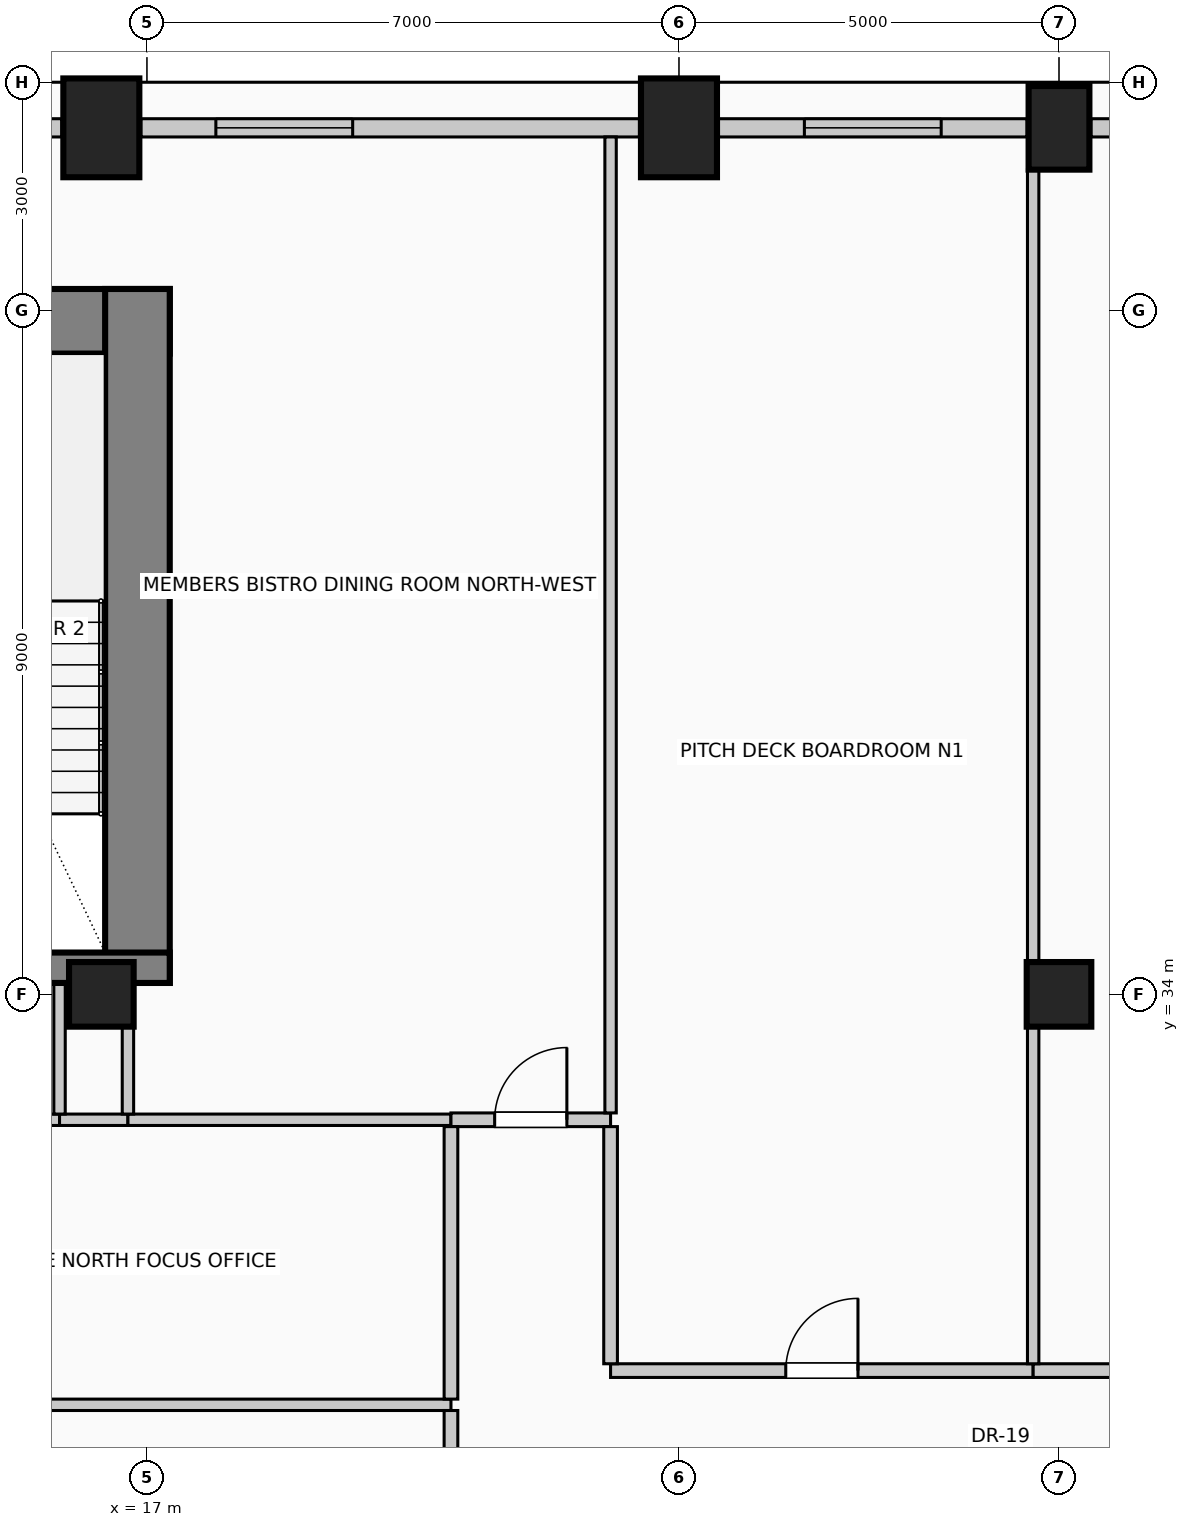
"""IFC4 building model, lengths in metres.
Left out: names, types, materials, properties, quantities, classifications, styles, units other than length and angle.
Written with IfcOpenShell. Run it as: python <this file> out.ifc"""

import sys

from ifc_helpers import new_model, si_unit, direction, frame, frame_2d, origin, origin_2d, place, context, subcontext, project, spatial, rectangle, circle, extrude, element, fill, save


model = new_model("IFC4")
c1 = context("Model", 3, precision=1e-05, world=origin(), true_north=direction((0.0, 1.0)))
c2 = subcontext(c1, "Body", "Model", "MODEL_VIEW")
j1 = project(units=[si_unit("LENGTHUNIT", "METRE"), si_unit("PLANEANGLEUNIT", "RADIAN")], contexts=[c1])
p1 = place(None, origin())
s1 = spatial("IfcSite", under=j1, at=p1, CompositionType="ELEMENT")
p2 = place(p1, origin())
s2 = spatial("IfcBuilding", under=s1, at=p2, CompositionType="ELEMENT")
p3 = place(p2, frame((0.0, 0.0, 174.6)))
s3 = spatial("IfcBuildingStorey", under=s2, at=p3, CompositionType="ELEMENT", Elevation=174.6)
p4 = place(p3, frame((2.7, 42.855, 0.0), z_axis=(0.0, 0.0, 1.0), x_axis=(1.0, 0.0, 0.0)))
e1 = element("IfcWall", 1, at=p4, inside=s3, PredefinedType="SHEAR", context=c2, shape_type="SweptSolid", body=[
    extrude(rectangle(XDim=14.6, YDim=0.85, at=frame_2d((7.3, 0.0))), origin(), (0.0, 0.0, 1.0), 4.0),
])
p5 = place(p3, frame((16.875, 34.15, 0.0), z_axis=(0.0, 0.0, 1.0), x_axis=(0.0, 1.0, 0.0)))
e2 = element("IfcWall", 2, at=p5, inside=s3, PredefinedType="SHEAR", context=c2, shape_type="SweptSolid", body=[
    extrude(rectangle(XDim=9.13, YDim=0.85, at=frame_2d((4.565, 0.0))), origin(), (0.0, 0.0, 1.0), 4.0),
])
p6 = place(p3, frame((12.29, 34.35, 0.0), z_axis=(0.0, 0.0, 1.0), x_axis=(1.0, 0.0, 0.0)))
e3 = element("IfcWall", 3, at=p6, inside=s3, PredefinedType="SHEAR", context=c2, shape_type="SweptSolid", body=[
    extrude(rectangle(XDim=5.01, YDim=0.4, at=frame_2d((2.505, 0.0))), origin(), (0.0, 0.0, 1.0), 4.0),
])
p7 = place(p6, frame((1.4, 0.0, 0.0)))
e4 = element("IfcOpeningElement", 4, at=p7, cuts=e3, PredefinedType="OPENING", context=c2, shape_type="SweptSolid", body=[
    extrude(rectangle(XDim=1.15, YDim=2.2, at=frame_2d((0.575, 1.1))), frame((0.0, 0.21, 0.0), z_axis=(0.0, -1.0, 0.0), x_axis=(1.0, 0.0, 0.0)), (0.0, 0.0, 1.0), 0.42),
])
for number, where, z_axis, x_axis in (
    (5, (16.4, 45.4, 0.0), (0.0, 0.0, 1.0), (1.0, 0.0, 0.0)),
    (6, (24.0, 45.4, 0.0), (0.0, 0.0, 1.0), (1.0, 0.0, 0.0)),
):
    element("IfcColumn", number, at=place(p3, frame(where, z_axis=z_axis, x_axis=x_axis)), inside=s3, PredefinedType="COLUMN", context=c2, shape_type="SweptSolid", body=[
        extrude(rectangle(XDim=1.0, YDim=1.3, at=origin_2d()), origin(), (0.0, 0.0, 1.0), 4.0),
    ])
p8 = place(p3, frame((29.0, 45.4, 0.0), z_axis=(0.0, 0.0, 1.0), x_axis=(1.0, 0.0, 0.0)))
e7 = element("IfcColumn", 7, at=p8, inside=s3, PredefinedType="COLUMN", context=c2, shape_type="SweptSolid", body=[
    extrude(rectangle(XDim=0.8, YDim=1.1, at=origin_2d()), origin(), (0.0, 0.0, 1.0), 4.0),
])
for number, where, z_axis, x_axis in (
    (8, (16.4, 34.0, 0.0), (0.0, 0.0, 1.0), (1.0, 0.0, 0.0)),
    (9, (29.0, 34.0, 0.0), (0.0, 0.0, 1.0), (1.0, 0.0, 0.0)),
):
    element("IfcColumn", number, at=place(p3, frame(where, z_axis=z_axis, x_axis=x_axis)), inside=s3, PredefinedType="COLUMN", context=c2, shape_type="SweptSolid", body=[
        extrude(circle(Radius=0.425, at=origin_2d()), origin(), (0.0, 0.0, 1.0), 4.0),
    ])
p9 = place(p3, frame((14.42, 45.4, 0.0), z_axis=(0.0, 0.0, 1.0), x_axis=(1.0, 0.0, 0.0)))
e10 = element("IfcWall", 10, at=p9, inside=s3, PredefinedType="SOLIDWALL", context=c2, shape_type="SweptSolid", body=[
    extrude(rectangle(XDim=1.46, YDim=0.24, at=frame_2d((0.73, 0.0))), origin(), (0.0, 0.0, 1.0), 2.975),
])
p10 = place(p3, frame((16.92, 45.4, 0.0), z_axis=(0.0, 0.0, 1.0), x_axis=(1.0, 0.0, 0.0)))
e11 = element("IfcWall", 11, at=p10, inside=s3, PredefinedType="SOLIDWALL", context=c2, shape_type="SweptSolid", body=[
    extrude(rectangle(XDim=6.56, YDim=0.24, at=frame_2d((3.28, 0.0))), origin(), (0.0, 0.0, 1.0), 2.975),
])
p11 = place(p10, frame((0.987, 0.0, 0.42)))
e12 = element("IfcOpeningElement", 12, at=p11, cuts=e11, PredefinedType="OPENING", context=c2, shape_type="SweptSolid", body=[
    extrude(rectangle(XDim=1.8, YDim=2.2, at=frame_2d((0.9, 1.1))), frame((0.0, 0.13, 0.0), z_axis=(0.0, -1.0, 0.0), x_axis=(1.0, 0.0, 0.0)), (0.0, 0.0, 1.0), 0.26),
])
p12 = place(p3, frame((24.52, 45.4, 0.0), z_axis=(0.0, 0.0, 1.0), x_axis=(1.0, 0.0, 0.0)))
e13 = element("IfcWall", 13, at=p12, inside=s3, PredefinedType="SOLIDWALL", context=c2, shape_type="SweptSolid", body=[
    extrude(rectangle(XDim=4.06, YDim=0.24, at=frame_2d((2.03, 0.0))), origin(), (0.0, 0.0, 1.0), 2.975),
])
p13 = place(p12, frame((1.13, 0.0, 0.42)))
e14 = element("IfcOpeningElement", 14, at=p13, cuts=e13, PredefinedType="OPENING", context=c2, shape_type="SweptSolid", body=[
    extrude(rectangle(XDim=1.8, YDim=2.2, at=frame_2d((0.9, 1.1))), frame((0.0, 0.13, 0.0), z_axis=(0.0, -1.0, 0.0), x_axis=(1.0, 0.0, 0.0)), (0.0, 0.0, 1.0), 0.26),
])
p14 = place(p3, frame((29.42, 45.4, 0.0), z_axis=(0.0, 0.0, 1.0), x_axis=(1.0, 0.0, 0.0)))
e15 = element("IfcWall", 15, at=p14, inside=s3, PredefinedType="SOLIDWALL", context=c2, shape_type="SweptSolid", body=[
    extrude(rectangle(XDim=4.06, YDim=0.24, at=frame_2d((2.03, 0.0))), origin(), (0.0, 0.0, 1.0), 2.975),
])
p15 = place(p3, frame((12.2, 28.6, 0.0), z_axis=(0.0, 0.0, 1.0), x_axis=(1.0, 0.0, 0.0)))
e16 = element("IfcWall", 16, at=p15, inside=s3, PredefinedType="PARTITIONING", context=c2, shape_type="SweptSolid", body=[
    extrude(rectangle(XDim=8.8, YDim=0.15, at=frame_2d((4.4, 0.0))), origin(), (0.0, 0.0, 1.0), 3.725),
])
p16 = place(p3, frame((23.1, 29.05, 0.0), z_axis=(0.0, 0.0, 1.0), x_axis=(1.0, 0.0, 0.0)))
e17 = element("IfcWall", 17, at=p16, inside=s3, PredefinedType="PARTITIONING", context=c2, shape_type="SweptSolid", body=[
    extrude(rectangle(XDim=5.56, YDim=0.18, at=frame_2d((2.78, 0.0))), origin(), (0.0, 0.0, 1.0), 3.725),
])
p17 = place(p16, frame((2.305, 0.0, 0.0)))
e18 = element("IfcOpeningElement", 18, at=p17, cuts=e17, PredefinedType="OPENING", context=c2, shape_type="SweptSolid", body=[
    extrude(rectangle(XDim=0.95, YDim=2.15, at=frame_2d((0.475, 1.075))), frame((0.0, 0.1, 0.0), z_axis=(0.0, -1.0, 0.0), x_axis=(1.0, 0.0, 0.0)), (0.0, 0.0, 1.0), 0.2),
])
p18 = place(p3, frame((28.66, 29.05, 0.0), z_axis=(0.0, 0.0, 1.0), x_axis=(1.0, 0.0, 0.0)))
e19 = element("IfcWall", 19, at=p18, inside=s3, PredefinedType="PARTITIONING", context=c2, shape_type="SweptSolid", body=[
    extrude(rectangle(XDim=3.67, YDim=0.18, at=frame_2d((1.835, 0.0))), origin(), (0.0, 0.0, 1.0), 3.725),
])
p19 = place(p18, frame((1.31, 0.0, 0.0)))
e20 = element("IfcOpeningElement", 20, at=p19, cuts=e19, PredefinedType="OPENING", context=c2, shape_type="SweptSolid", body=[
    extrude(rectangle(XDim=1.05, YDim=2.15, at=frame_2d((0.525, 1.075))), frame((0.0, 0.1, 0.0), z_axis=(0.0, -1.0, 0.0), x_axis=(1.0, 0.0, 0.0)), (0.0, 0.0, 1.0), 0.2),
])
p20 = place(p3, frame((12.33, 32.35, 0.0), z_axis=(0.0, 0.0, 1.0), x_axis=(1.0, 0.0, 0.0)))
e21 = element("IfcWall", 21, at=p20, inside=s3, PredefinedType="PARTITIONING", context=c2, shape_type="SweptSolid", body=[
    extrude(rectangle(XDim=3.52, YDim=0.15, at=frame_2d((1.76, 0.0))), origin(), (0.0, 0.0, 1.0), 3.725),
])
p21 = place(p20, frame((1.235, 0.0, 0.0)))
e22 = element("IfcOpeningElement", 22, at=p21, cuts=e21, PredefinedType="OPENING", context=c2, shape_type="SweptSolid", body=[
    extrude(rectangle(XDim=1.05, YDim=2.15, at=frame_2d((0.525, 1.075))), frame((0.0, 0.085, 0.0), z_axis=(0.0, -1.0, 0.0), x_axis=(1.0, 0.0, 0.0)), (0.0, 0.0, 1.0), 0.17),
])
p22 = place(p3, frame((15.85, 32.35, 0.0), z_axis=(0.0, 0.0, 1.0), x_axis=(1.0, 0.0, 0.0)))
e23 = element("IfcWall", 23, at=p22, inside=s3, PredefinedType="PARTITIONING", context=c2, shape_type="SweptSolid", body=[
    extrude(rectangle(XDim=0.9, YDim=0.15, at=frame_2d((0.45, 0.0))), origin(), (0.0, 0.0, 1.0), 3.725),
])
p23 = place(p3, frame((16.75, 32.35, 0.0), z_axis=(0.0, 0.0, 1.0), x_axis=(1.0, 0.0, 0.0)))
e24 = element("IfcWall", 24, at=p23, inside=s3, PredefinedType="PARTITIONING", context=c2, shape_type="SweptSolid", body=[
    extrude(rectangle(XDim=4.25, YDim=0.15, at=frame_2d((2.125, 0.0))), origin(), (0.0, 0.0, 1.0), 3.725),
])
p24 = place(p3, frame((21.0, 32.35, 0.0), z_axis=(0.0, 0.0, 1.0), x_axis=(1.0, 0.0, 0.0)))
e25 = element("IfcWall", 25, at=p24, inside=s3, PredefinedType="PARTITIONING", context=c2, shape_type="SweptSolid", body=[
    extrude(rectangle(XDim=2.1, YDim=0.18, at=frame_2d((1.05, 0.0))), origin(), (0.0, 0.0, 1.0), 3.725),
])
p25 = place(p24, frame((0.575, 0.0, 0.0)))
e26 = element("IfcOpeningElement", 26, at=p25, cuts=e25, PredefinedType="OPENING", context=c2, shape_type="SweptSolid", body=[
    extrude(rectangle(XDim=0.95, YDim=2.15, at=frame_2d((0.475, 1.075))), frame((0.0, 0.1, 0.0), z_axis=(0.0, -1.0, 0.0), x_axis=(1.0, 0.0, 0.0)), (0.0, 0.0, 1.0), 0.2),
])
p26 = place(p3, frame((15.85, 32.425, 0.0), z_axis=(0.0, 0.0, 1.0), x_axis=(0.0, 1.0, 0.0)))
e27 = element("IfcWall", 27, at=p26, inside=s3, PredefinedType="PARTITIONING", context=c2, shape_type="SweptSolid", body=[
    extrude(rectangle(XDim=1.725, YDim=0.15, at=frame_2d((0.862, 0.0))), origin(), (0.0, 0.0, 1.0), 3.725),
])
p27 = place(p3, frame((16.75, 32.425, 0.0), z_axis=(0.0, 0.0, 1.0), x_axis=(0.0, 1.0, 0.0)))
e28 = element("IfcWall", 28, at=p27, inside=s3, PredefinedType="PARTITIONING", context=c2, shape_type="SweptSolid", body=[
    extrude(rectangle(XDim=1.15, YDim=0.15, at=frame_2d((0.575, 0.0))), origin(), (0.0, 0.0, 1.0), 3.725),
])
p28 = place(p3, frame((21.0, 24.875, 0.0), z_axis=(0.0, 0.0, 1.0), x_axis=(0.0, 1.0, 0.0)))
e29 = element("IfcWall", 29, at=p28, inside=s3, PredefinedType="PARTITIONING", context=c2, shape_type="SweptSolid", body=[
    extrude(rectangle(XDim=3.65, YDim=0.18, at=frame_2d((1.825, 0.0))), origin(), (0.0, 0.0, 1.0), 3.725),
])
p29 = place(p3, frame((21.0, 28.675, 0.0), z_axis=(0.0, 0.0, 1.0), x_axis=(0.0, 1.0, 0.0)))
e30 = element("IfcWall", 30, at=p29, inside=s3, PredefinedType="PARTITIONING", context=c2, shape_type="SweptSolid", body=[
    extrude(rectangle(XDim=3.585, YDim=0.18, at=frame_2d((1.792, 0.0))), origin(), (0.0, 0.0, 1.0), 3.725),
])
p30 = place(p3, frame((23.1, 29.14, 0.0), z_axis=(0.0, 0.0, 1.0), x_axis=(0.0, 1.0, 0.0)))
e31 = element("IfcWall", 31, at=p30, inside=s3, PredefinedType="PARTITIONING", context=c2, shape_type="SweptSolid", body=[
    extrude(rectangle(XDim=3.12, YDim=0.18, at=frame_2d((1.56, 0.0))), origin(), (0.0, 0.0, 1.0), 3.725),
])
p31 = place(p3, frame((23.1, 32.44, 0.0), z_axis=(0.0, 0.0, 1.0), x_axis=(0.0, 1.0, 0.0)))
e32 = element("IfcWall", 32, at=p31, inside=s3, PredefinedType="PARTITIONING", context=c2, shape_type="SweptSolid", body=[
    extrude(rectangle(XDim=12.84, YDim=0.15, at=frame_2d((6.42, 0.0))), origin(), (0.0, 0.0, 1.0), 3.725),
])
p32 = place(p3, frame((28.66, 29.14, 0.0), z_axis=(0.0, 0.0, 1.0), x_axis=(0.0, 1.0, 0.0)))
e33 = element("IfcWall", 33, at=p32, inside=s3, PredefinedType="PARTITIONING", context=c2, shape_type="SweptSolid", body=[
    extrude(rectangle(XDim=4.435, YDim=0.15, at=frame_2d((2.218, 0.0))), origin(), (0.0, 0.0, 1.0), 3.725),
])
p33 = place(p3, frame((28.66, 34.425, 0.0), z_axis=(0.0, 0.0, 1.0), x_axis=(0.0, 1.0, 0.0)))
e34 = element("IfcWall", 34, at=p33, inside=s3, PredefinedType="PARTITIONING", context=c2, shape_type="SweptSolid", body=[
    extrude(rectangle(XDim=10.425, YDim=0.15, at=frame_2d((5.212, 0.0))), origin(), (0.0, 0.0, 1.0), 3.725),
])
p34 = place(p11, origin())
e35 = element("IfcWindow", 35, at=p34, inside=s3, PartitioningType="SINGLE_PANEL", PredefinedType="WINDOW", context=c2, shape_type="SweptSolid", body=[
    extrude(rectangle(XDim=1.8, YDim=2.2, at=frame_2d((0.9, 1.1))), frame((0.0, 0.03, 0.0), z_axis=(0.0, -1.0, 0.0), x_axis=(1.0, 0.0, 0.0)), (0.0, 0.0, 1.0), 0.06),
])
fill(e12, e35)
p35 = place(p13, origin())
e36 = element("IfcWindow", 36, at=p35, inside=s3, PartitioningType="SINGLE_PANEL", PredefinedType="WINDOW", context=c2, shape_type="SweptSolid", body=[
    extrude(rectangle(XDim=1.8, YDim=2.2, at=frame_2d((0.9, 1.1))), frame((0.0, 0.03, 0.0), z_axis=(0.0, -1.0, 0.0), x_axis=(1.0, 0.0, 0.0)), (0.0, 0.0, 1.0), 0.06),
])
fill(e14, e36)
p36 = place(p17, origin())
e37 = element("IfcDoor", 37, at=p36, inside=s3, OperationType="SINGLE_SWING_RIGHT", PredefinedType="DOOR", context=c2, shape_type="SweptSolid", body=[
    extrude(rectangle(XDim=0.95, YDim=2.15, at=frame_2d((0.475, 1.075))), frame((0.0, 0.025, 0.0), z_axis=(0.0, -1.0, 0.0), x_axis=(1.0, 0.0, 0.0)), (0.0, 0.0, 1.0), 0.05),
])
fill(e18, e37)
p37 = place(p25, origin())
e38 = element("IfcDoor", 38, at=p37, inside=s3, OperationType="SINGLE_SWING_RIGHT", PredefinedType="DOOR", context=c2, shape_type="SweptSolid", body=[
    extrude(rectangle(XDim=0.95, YDim=2.15, at=frame_2d((0.475, 1.075))), frame((0.0, 0.025, 0.0), z_axis=(0.0, -1.0, 0.0), x_axis=(1.0, 0.0, 0.0)), (0.0, 0.0, 1.0), 0.05),
])
fill(e26, e38)
save(model, sys.argv[1])
